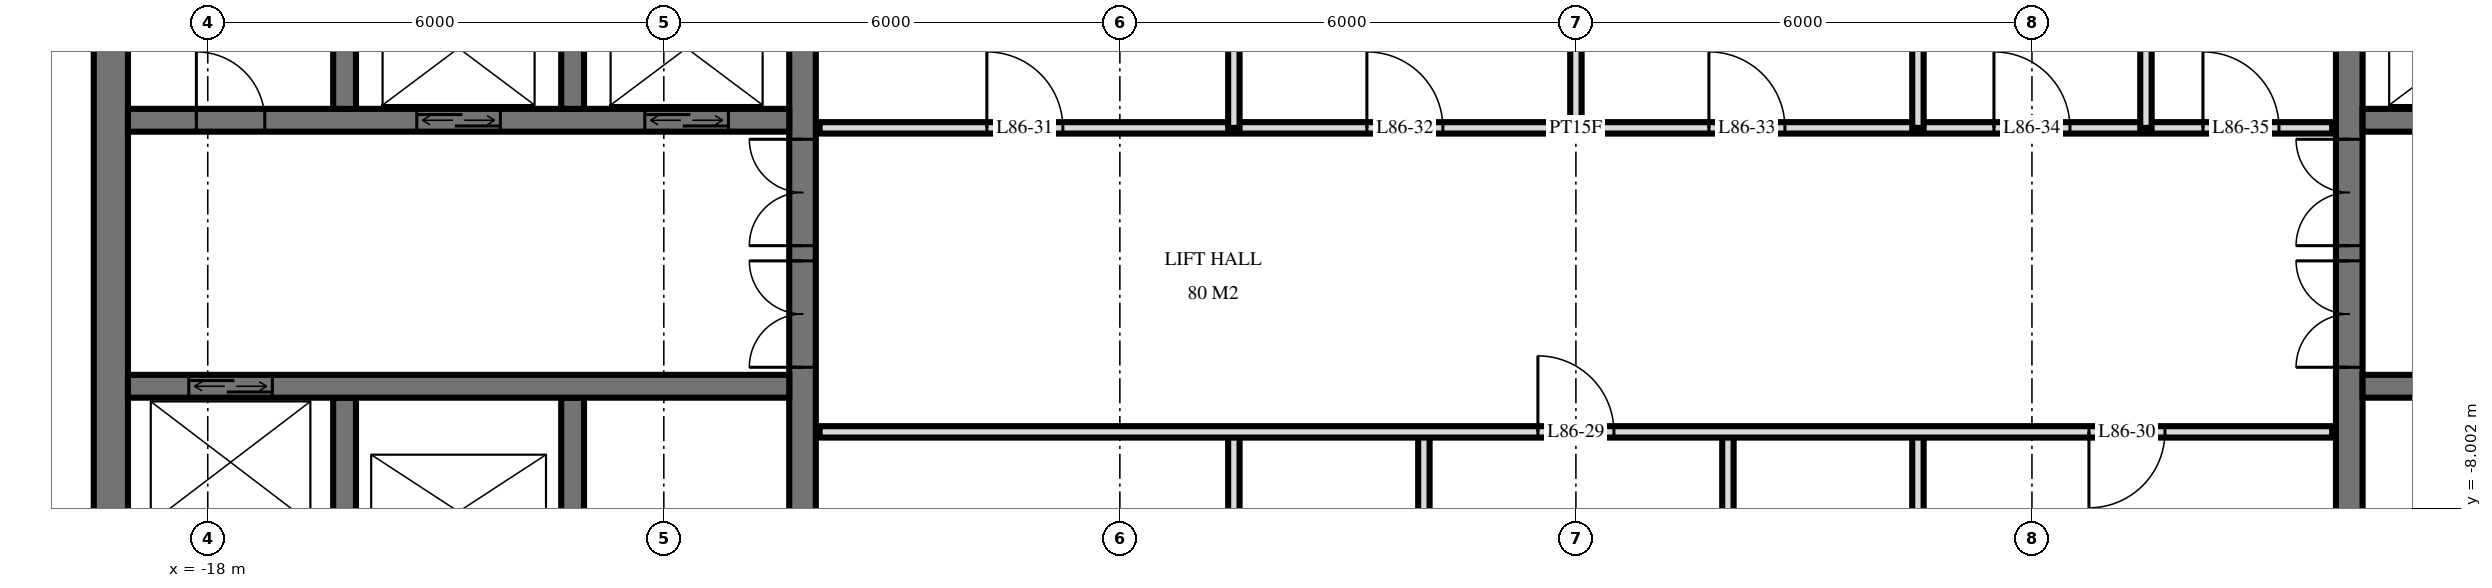
"""IFC4 building model, lengths in metres.
Left out: names, types, materials, properties, quantities, classifications, styles, units other than length and angle.
Written with IfcOpenShell. Run it as: python <this file> out.ifc"""

import sys

from ifc_helpers import new_model, si_unit, direction, frame, frame_2d, origin, place, context, subcontext, project, spatial, rectangle, extrude, element, fill, save


model = new_model("IFC4")
c1 = context("Model", 3, precision=1e-05, world=origin(), true_north=direction((0.0, 1.0)))
c2 = subcontext(c1, "Body", "Model", "MODEL_VIEW")
j1 = project(units=[si_unit("LENGTHUNIT", "METRE"), si_unit("PLANEANGLEUNIT", "RADIAN")], contexts=[c1])
p1 = place(None, origin())
s1 = spatial("IfcSite", under=j1, at=p1, CompositionType="ELEMENT")
p2 = place(p1, origin())
s2 = spatial("IfcBuilding", under=s1, at=p2, CompositionType="ELEMENT")
p3 = place(p2, frame((0.0, 0.0, 326.6)))
s3 = spatial("IfcBuildingStorey", under=s2, at=p3, CompositionType="ELEMENT", Elevation=326.6)
p4 = place(p3, frame((-10.175, -14.55, 0.0), z_axis=(0.0, 0.0, 1.0), x_axis=(0.0, 1.0, 0.0)))
e1 = element("IfcWall", 1, at=p4, inside=s3, PredefinedType="SHEAR", context=c2, shape_type="SweptSolid", body=[
    extrude(rectangle(XDim=14.1, YDim=0.35, at=frame_2d((7.05, 0.0))), origin(), (0.0, 0.0, 1.0), 4.0),
])
p5 = place(p4, frame((8.4, 0.0, 0.0)))
e2 = element("IfcOpeningElement", 2, at=p5, cuts=e1, PredefinedType="OPENING", context=c2, shape_type="SweptSolid", body=[
    extrude(rectangle(XDim=1.4, YDim=2.4, at=frame_2d((0.7, 1.2))), frame((0.0, 0.185, 0.0), z_axis=(0.0, -1.0, 0.0), x_axis=(1.0, 0.0, 0.0)), (0.0, 0.0, 1.0), 0.37),
])
p6 = place(p4, frame((10.0, 0.0, 0.0)))
e3 = element("IfcOpeningElement", 3, at=p6, cuts=e1, PredefinedType="OPENING", context=c2, shape_type="SweptSolid", body=[
    extrude(rectangle(XDim=1.4, YDim=2.4, at=frame_2d((0.7, 1.2))), frame((0.0, 0.185, 0.0), z_axis=(0.0, -1.0, 0.0), x_axis=(1.0, 0.0, 0.0)), (0.0, 0.0, 1.0), 0.37),
])
p7 = place(p4, frame((4.0, 0.0, 0.0)))
e4 = element("IfcOpeningElement", 4, at=p7, cuts=e1, PredefinedType="OPENING", context=c2, shape_type="SweptSolid", body=[
    extrude(rectangle(XDim=1.2, YDim=2.1, at=frame_2d((0.6, 1.05))), frame((0.0, 0.185, 0.0), z_axis=(0.0, -1.0, 0.0), x_axis=(1.0, 0.0, 0.0)), (0.0, 0.0, 1.0), 0.37),
])
p8 = place(p3, frame((-19.275, -14.55, 0.0), z_axis=(0.0, 0.0, 1.0), x_axis=(0.0, 1.0, 0.0)))
e5 = element("IfcWall", 5, at=p8, inside=s3, PredefinedType="SHEAR", context=c2, shape_type="SweptSolid", body=[
    extrude(rectangle(XDim=14.1, YDim=0.45, at=frame_2d((7.05, 0.0))), origin(), (0.0, 0.0, 1.0), 4.0),
])
p9 = place(p3, frame((-19.05, -2.9, 0.0), z_axis=(0.0, 0.0, 1.0), x_axis=(1.0, 0.0, 0.0)))
e6 = element("IfcWall", 6, at=p9, inside=s3, PredefinedType="SHEAR", context=c2, shape_type="SweptSolid", body=[
    extrude(rectangle(XDim=8.7, YDim=0.3, at=frame_2d((4.35, 0.0))), origin(), (0.0, 0.0, 1.0), 4.0),
])
p10 = place(p9, frame((6.8, 0.0, 0.0)))
e7 = element("IfcOpeningElement", 7, at=p10, cuts=e6, PredefinedType="OPENING", context=c2, shape_type="SweptSolid", body=[
    extrude(rectangle(XDim=1.1, YDim=2.1, at=frame_2d((0.55, 1.05))), frame((0.0, 0.16, 0.0), z_axis=(0.0, -1.0, 0.0), x_axis=(1.0, 0.0, 0.0)), (0.0, 0.0, 1.0), 0.32),
])
p11 = place(p9, frame((3.8, 0.0, 0.0)))
e8 = element("IfcOpeningElement", 8, at=p11, cuts=e6, PredefinedType="OPENING", context=c2, shape_type="SweptSolid", body=[
    extrude(rectangle(XDim=1.1, YDim=2.1, at=frame_2d((0.55, 1.05))), frame((0.0, 0.16, 0.0), z_axis=(0.0, -1.0, 0.0), x_axis=(1.0, 0.0, 0.0)), (0.0, 0.0, 1.0), 0.32),
])
p12 = place(p9, frame((0.9, 0.0, 0.0)))
e9 = element("IfcOpeningElement", 9, at=p12, cuts=e6, PredefinedType="OPENING", context=c2, shape_type="SweptSolid", body=[
    extrude(rectangle(XDim=0.9, YDim=2.1, at=frame_2d((0.45, 1.05))), frame((0.0, 0.16, 0.0), z_axis=(0.0, -1.0, 0.0), x_axis=(1.0, 0.0, 0.0)), (0.0, 0.0, 1.0), 0.32),
])
p13 = place(p3, frame((-19.05, -6.4, 0.0), z_axis=(0.0, 0.0, 1.0), x_axis=(1.0, 0.0, 0.0)))
e10 = element("IfcWall", 10, at=p13, inside=s3, PredefinedType="SHEAR", context=c2, shape_type="SweptSolid", body=[
    extrude(rectangle(XDim=8.7, YDim=0.3, at=frame_2d((4.35, 0.0))), origin(), (0.0, 0.0, 1.0), 4.0),
])
p14 = place(p13, frame((0.8, 0.0, 0.0)))
e11 = element("IfcOpeningElement", 11, at=p14, cuts=e10, PredefinedType="OPENING", context=c2, shape_type="SweptSolid", body=[
    extrude(rectangle(XDim=1.1, YDim=2.1, at=frame_2d((0.55, 1.05))), frame((0.0, 0.16, 0.0), z_axis=(0.0, -1.0, 0.0), x_axis=(1.0, 0.0, 0.0)), (0.0, 0.0, 1.0), 0.32),
])
for number, where, z_axis, x_axis in (
    (12, (-13.2, -2.75, 0.0), (0.0, 0.0, 1.0), (0.0, 1.0, 0.0)),
    (13, (-13.2, -8.85, 0.0), (0.0, 0.0, 1.0), (0.0, 1.0, 0.0)),
    (14, (-16.2, -2.75, 0.0), (0.0, 0.0, 1.0), (0.0, 1.0, 0.0)),
    (15, (-16.2, -8.85, 0.0), (0.0, 0.0, 1.0), (0.0, 1.0, 0.0)),
):
    element("IfcWall", number, at=place(p3, frame(where, z_axis=z_axis, x_axis=x_axis)), inside=s3, PredefinedType="SHEAR", context=c2, shape_type="SweptSolid", body=[
        extrude(rectangle(XDim=2.3, YDim=0.3, at=frame_2d((1.15, 0.0))), origin(), (0.0, 0.0, 1.0), 4.0),
    ])
p15 = place(p3, frame((10.175, -14.55, 0.0), z_axis=(0.0, 0.0, 1.0), x_axis=(0.0, 1.0, 0.0)))
e16 = element("IfcWall", 16, at=p15, inside=s3, PredefinedType="SHEAR", context=c2, shape_type="SweptSolid", body=[
    extrude(rectangle(XDim=14.1, YDim=0.35, at=frame_2d((7.05, 0.0))), origin(), (0.0, 0.0, 1.0), 4.0),
])
p16 = place(p15, frame((8.4, 0.0, 0.0)))
e17 = element("IfcOpeningElement", 17, at=p16, cuts=e16, PredefinedType="OPENING", context=c2, shape_type="SweptSolid", body=[
    extrude(rectangle(XDim=1.4, YDim=2.4, at=frame_2d((0.7, 1.2))), frame((0.0, 0.185, 0.0), z_axis=(0.0, -1.0, 0.0), x_axis=(1.0, 0.0, 0.0)), (0.0, 0.0, 1.0), 0.37),
])
p17 = place(p15, frame((10.0, 0.0, 0.0)))
e18 = element("IfcOpeningElement", 18, at=p17, cuts=e16, PredefinedType="OPENING", context=c2, shape_type="SweptSolid", body=[
    extrude(rectangle(XDim=1.4, YDim=2.4, at=frame_2d((0.7, 1.2))), frame((0.0, 0.185, 0.0), z_axis=(0.0, -1.0, 0.0), x_axis=(1.0, 0.0, 0.0)), (0.0, 0.0, 1.0), 0.37),
])
p18 = place(p15, frame((4.0, 0.0, 0.0)))
e19 = element("IfcOpeningElement", 19, at=p18, cuts=e16, PredefinedType="OPENING", context=c2, shape_type="SweptSolid", body=[
    extrude(rectangle(XDim=1.2, YDim=2.1, at=frame_2d((0.6, 1.05))), frame((0.0, 0.185, 0.0), z_axis=(0.0, -1.0, 0.0), x_axis=(1.0, 0.0, 0.0)), (0.0, 0.0, 1.0), 0.37),
])
p19 = place(p3, frame((10.35, -2.9, 0.0), z_axis=(0.0, 0.0, 1.0), x_axis=(1.0, 0.0, 0.0)))
e20 = element("IfcWall", 20, at=p19, inside=s3, PredefinedType="SHEAR", context=c2, shape_type="SweptSolid", body=[
    extrude(rectangle(XDim=8.7, YDim=0.3, at=frame_2d((4.35, 0.0))), origin(), (0.0, 0.0, 1.0), 4.0),
])
p20 = place(p19, frame((0.8, 0.0, 0.0)))
e21 = element("IfcOpeningElement", 21, at=p20, cuts=e20, PredefinedType="OPENING", context=c2, shape_type="SweptSolid", body=[
    extrude(rectangle(XDim=1.1, YDim=2.1, at=frame_2d((0.55, 1.05))), frame((0.0, 0.16, 0.0), z_axis=(0.0, -1.0, 0.0), x_axis=(1.0, 0.0, 0.0)), (0.0, 0.0, 1.0), 0.32),
])
p21 = place(p19, frame((3.8, 0.0, 0.0)))
e22 = element("IfcOpeningElement", 22, at=p21, cuts=e20, PredefinedType="OPENING", context=c2, shape_type="SweptSolid", body=[
    extrude(rectangle(XDim=1.1, YDim=2.1, at=frame_2d((0.55, 1.05))), frame((0.0, 0.16, 0.0), z_axis=(0.0, -1.0, 0.0), x_axis=(1.0, 0.0, 0.0)), (0.0, 0.0, 1.0), 0.32),
])
p22 = place(p19, frame((6.9, 0.0, 0.0)))
e23 = element("IfcOpeningElement", 23, at=p22, cuts=e20, PredefinedType="OPENING", context=c2, shape_type="SweptSolid", body=[
    extrude(rectangle(XDim=0.9, YDim=2.1, at=frame_2d((0.45, 1.05))), frame((0.0, 0.16, 0.0), z_axis=(0.0, -1.0, 0.0), x_axis=(1.0, 0.0, 0.0)), (0.0, 0.0, 1.0), 0.32),
])
p23 = place(p3, frame((10.35, -6.4, 0.0), z_axis=(0.0, 0.0, 1.0), x_axis=(1.0, 0.0, 0.0)))
e24 = element("IfcWall", 24, at=p23, inside=s3, PredefinedType="SHEAR", context=c2, shape_type="SweptSolid", body=[
    extrude(rectangle(XDim=8.7, YDim=0.3, at=frame_2d((4.35, 0.0))), origin(), (0.0, 0.0, 1.0), 4.0),
])
p24 = place(p23, frame((6.8, 0.0, 0.0)))
e25 = element("IfcOpeningElement", 25, at=p24, cuts=e24, PredefinedType="OPENING", context=c2, shape_type="SweptSolid", body=[
    extrude(rectangle(XDim=1.1, YDim=2.1, at=frame_2d((0.55, 1.05))), frame((0.0, 0.16, 0.0), z_axis=(0.0, -1.0, 0.0), x_axis=(1.0, 0.0, 0.0)), (0.0, 0.0, 1.0), 0.32),
])
p25 = place(p3, frame((7.5, -3.0, 0.0), z_axis=(0.0, 0.0, 1.0), x_axis=(0.0, 1.0, 0.0)))
e26 = element("IfcWall", 26, at=p25, inside=s3, PredefinedType="PLUMBINGWALL", context=c2, shape_type="SweptSolid", body=[
    extrude(rectangle(XDim=7.445, YDim=0.15, at=frame_2d((3.723, 0.0))), origin(), (0.0, 0.0, 1.0), 3.72),
])
p26 = place(p3, frame((4.5, -11.0, 0.0), z_axis=(0.0, 0.0, 1.0), x_axis=(0.0, 1.0, 0.0)))
e27 = element("IfcWall", 27, at=p26, inside=s3, PredefinedType="PARTITIONING", context=c2, shape_type="SweptSolid", body=[
    extrude(rectangle(XDim=4.0, YDim=0.15, at=frame_2d((2.0, 0.0))), origin(), (0.0, 0.0, 1.0), 3.72),
])
p27 = place(p3, frame((4.5, -3.0, 0.0), z_axis=(0.0, 0.0, 1.0), x_axis=(0.0, 1.0, 0.0)))
e28 = element("IfcWall", 28, at=p27, inside=s3, PredefinedType="PLUMBINGWALL", context=c2, shape_type="SweptSolid", body=[
    extrude(rectangle(XDim=7.077, YDim=0.15, at=frame_2d((3.539, 0.0))), origin(), (0.0, 0.0, 1.0), 3.72),
])
p28 = place(p3, frame((2.0, -11.0, 0.0), z_axis=(0.0, 0.0, 1.0), x_axis=(0.0, 1.0, 0.0)))
e29 = element("IfcWall", 29, at=p28, inside=s3, PredefinedType="PARTITIONING", context=c2, shape_type="SweptSolid", body=[
    extrude(rectangle(XDim=4.0, YDim=0.15, at=frame_2d((2.0, 0.0))), origin(), (0.0, 0.0, 1.0), 3.72),
])
p29 = place(p28, frame((1.5, 0.0, 0.0)))
e30 = element("IfcOpeningElement", 30, at=p29, cuts=e29, PredefinedType="OPENING", context=c2, shape_type="SweptSolid", body=[
    extrude(rectangle(XDim=1.0, YDim=2.1, at=frame_2d((0.5, 1.05))), frame((0.0, 0.085, 0.0), z_axis=(0.0, -1.0, 0.0), x_axis=(1.0, 0.0, 0.0)), (0.0, 0.0, 1.0), 0.17),
])
p30 = place(p3, frame((0.0, -3.0, 0.0), z_axis=(0.0, 0.0, 1.0), x_axis=(0.0, 1.0, 0.0)))
e31 = element("IfcWall", 31, at=p30, inside=s3, PredefinedType="PARTITIONING", context=c2, shape_type="SweptSolid", body=[
    extrude(rectangle(XDim=6.524, YDim=0.15, at=frame_2d((3.262, 0.0))), origin(), (0.0, 0.0, 1.0), 3.72),
])
p31 = place(p3, frame((-2.0, -11.0, 0.0), z_axis=(0.0, 0.0, 1.0), x_axis=(0.0, 1.0, 0.0)))
e32 = element("IfcWall", 32, at=p31, inside=s3, PredefinedType="PARTITIONING", context=c2, shape_type="SweptSolid", body=[
    extrude(rectangle(XDim=4.0, YDim=0.15, at=frame_2d((2.0, 0.0))), origin(), (0.0, 0.0, 1.0), 3.72),
])
p32 = place(p31, frame((1.5, 0.0, 0.0)))
e33 = element("IfcOpeningElement", 33, at=p32, cuts=e32, PredefinedType="OPENING", context=c2, shape_type="SweptSolid", body=[
    extrude(rectangle(XDim=1.0, YDim=2.1, at=frame_2d((0.5, 1.05))), frame((0.0, 0.085, 0.0), z_axis=(0.0, -1.0, 0.0), x_axis=(1.0, 0.0, 0.0)), (0.0, 0.0, 1.0), 0.17),
])
p33 = place(p3, frame((-4.5, -11.0, 0.0), z_axis=(0.0, 0.0, 1.0), x_axis=(0.0, 1.0, 0.0)))
e34 = element("IfcWall", 34, at=p33, inside=s3, PredefinedType="PARTITIONING", context=c2, shape_type="SweptSolid", body=[
    extrude(rectangle(XDim=4.0, YDim=0.15, at=frame_2d((2.0, 0.0))), origin(), (0.0, 0.0, 1.0), 3.72),
])
p34 = place(p3, frame((-4.5, -3.0, 0.0), z_axis=(0.0, 0.0, 1.0), x_axis=(0.0, 1.0, 0.0)))
e35 = element("IfcWall", 35, at=p34, inside=s3, PredefinedType="PARTITIONING", context=c2, shape_type="SweptSolid", body=[
    extrude(rectangle(XDim=5.972, YDim=0.15, at=frame_2d((2.986, 0.0))), origin(), (0.0, 0.0, 1.0), 3.72),
])
p35 = place(p3, frame((-9.95, -7.0, 0.0), z_axis=(0.0, 0.0, 1.0), x_axis=(1.0, 0.0, 0.0)))
e36 = element("IfcWall", 36, at=p35, inside=s3, PredefinedType="PARTITIONING", context=c2, shape_type="SweptSolid", body=[
    extrude(rectangle(XDim=19.9, YDim=0.15, at=frame_2d((9.95, 0.0))), origin(), (0.0, 0.0, 1.0), 3.72),
])
p36 = place(p35, frame((9.45, 0.0, 0.0)))
e37 = element("IfcOpeningElement", 37, at=p36, cuts=e36, PredefinedType="OPENING", context=c2, shape_type="SweptSolid", body=[
    extrude(rectangle(XDim=1.0, YDim=2.1, at=frame_2d((0.5, 1.05))), frame((0.0, 0.085, 0.0), z_axis=(0.0, -1.0, 0.0), x_axis=(1.0, 0.0, 0.0)), (0.0, 0.0, 1.0), 0.17),
])
p37 = place(p35, frame((16.7, 0.0, 0.0)))
e38 = element("IfcOpeningElement", 38, at=p37, cuts=e36, PredefinedType="OPENING", context=c2, shape_type="SweptSolid", body=[
    extrude(rectangle(XDim=1.0, YDim=2.1, at=frame_2d((0.5, 1.05))), frame((0.0, 0.085, 0.0), z_axis=(0.0, -1.0, 0.0), x_axis=(1.0, 0.0, 0.0)), (0.0, 0.0, 1.0), 0.17),
])
p38 = place(p3, frame((-9.95, -3.0, 0.0), z_axis=(0.0, 0.0, 1.0), x_axis=(1.0, 0.0, 0.0)))
e39 = element("IfcWall", 39, at=p38, inside=s3, PredefinedType="PARTITIONING", context=c2, shape_type="SweptSolid", body=[
    extrude(rectangle(XDim=19.9, YDim=0.15, at=frame_2d((9.95, 0.0))), origin(), (0.0, 0.0, 1.0), 3.72),
])
p39 = place(p38, frame((2.2, 0.0, 0.0)))
e40 = element("IfcOpeningElement", 40, at=p39, cuts=e39, PredefinedType="OPENING", context=c2, shape_type="SweptSolid", body=[
    extrude(rectangle(XDim=1.0, YDim=2.1, at=frame_2d((0.5, 1.05))), frame((0.0, 0.085, 0.0), z_axis=(0.0, -1.0, 0.0), x_axis=(1.0, 0.0, 0.0)), (0.0, 0.0, 1.0), 0.17),
])
p40 = place(p38, frame((7.2, 0.0, 0.0)))
e41 = element("IfcOpeningElement", 41, at=p40, cuts=e39, PredefinedType="OPENING", context=c2, shape_type="SweptSolid", body=[
    extrude(rectangle(XDim=1.0, YDim=2.1, at=frame_2d((0.5, 1.05))), frame((0.0, 0.085, 0.0), z_axis=(0.0, -1.0, 0.0), x_axis=(1.0, 0.0, 0.0)), (0.0, 0.0, 1.0), 0.17),
])
p41 = place(p38, frame((11.7, 0.0, 0.0)))
e42 = element("IfcOpeningElement", 42, at=p41, cuts=e39, PredefinedType="OPENING", context=c2, shape_type="SweptSolid", body=[
    extrude(rectangle(XDim=1.0, YDim=2.1, at=frame_2d((0.5, 1.05))), frame((0.0, 0.085, 0.0), z_axis=(0.0, -1.0, 0.0), x_axis=(1.0, 0.0, 0.0)), (0.0, 0.0, 1.0), 0.17),
])
p42 = place(p38, frame((15.45, 0.0, 0.0)))
e43 = element("IfcOpeningElement", 43, at=p42, cuts=e39, PredefinedType="OPENING", context=c2, shape_type="SweptSolid", body=[
    extrude(rectangle(XDim=1.0, YDim=2.1, at=frame_2d((0.5, 1.05))), frame((0.0, 0.085, 0.0), z_axis=(0.0, -1.0, 0.0), x_axis=(1.0, 0.0, 0.0)), (0.0, 0.0, 1.0), 0.17),
])
p43 = place(p38, frame((18.2, 0.0, 0.0)))
e44 = element("IfcOpeningElement", 44, at=p43, cuts=e39, PredefinedType="OPENING", context=c2, shape_type="SweptSolid", body=[
    extrude(rectangle(XDim=1.0, YDim=2.1, at=frame_2d((0.5, 1.05))), frame((0.0, 0.085, 0.0), z_axis=(0.0, -1.0, 0.0), x_axis=(1.0, 0.0, 0.0)), (0.0, 0.0, 1.0), 0.17),
])
p44 = place(p10, origin())
e45 = element("IfcDoor", 45, at=p44, inside=s3, OperationType="DOUBLE_DOOR_SLIDING", PredefinedType="USERDEFINED", context=c2, shape_type="SweptSolid", body=[
    extrude(rectangle(XDim=1.1, YDim=2.1, at=frame_2d((0.55, 1.05))), frame((0.0, 0.025, 0.0), z_axis=(0.0, -1.0, 0.0), x_axis=(1.0, 0.0, 0.0)), (0.0, 0.0, 1.0), 0.05),
])
fill(e7, e45)
p45 = place(p11, origin())
e46 = element("IfcDoor", 46, at=p45, inside=s3, OperationType="DOUBLE_DOOR_SLIDING", PredefinedType="USERDEFINED", context=c2, shape_type="SweptSolid", body=[
    extrude(rectangle(XDim=1.1, YDim=2.1, at=frame_2d((0.55, 1.05))), frame((0.0, 0.025, 0.0), z_axis=(0.0, -1.0, 0.0), x_axis=(1.0, 0.0, 0.0)), (0.0, 0.0, 1.0), 0.05),
])
fill(e8, e46)
p46 = place(p14, origin())
e47 = element("IfcDoor", 47, at=p46, inside=s3, OperationType="DOUBLE_DOOR_SLIDING", PredefinedType="USERDEFINED", context=c2, shape_type="SweptSolid", body=[
    extrude(rectangle(XDim=1.1, YDim=2.1, at=frame_2d((0.55, 1.05))), frame((0.0, 0.025, 0.0), z_axis=(0.0, -1.0, 0.0), x_axis=(1.0, 0.0, 0.0)), (0.0, 0.0, 1.0), 0.05),
])
fill(e11, e47)
p47 = place(p5, origin())
e48 = element("IfcDoor", 48, at=p47, inside=s3, OperationType="DOUBLE_DOOR_SINGLE_SWING", PredefinedType="DOOR", context=c2, shape_type="SweptSolid", body=[
    extrude(rectangle(XDim=1.4, YDim=2.4, at=frame_2d((0.7, 1.2))), frame((0.0, 0.025, 0.0), z_axis=(0.0, -1.0, 0.0), x_axis=(1.0, 0.0, 0.0)), (0.0, 0.0, 1.0), 0.05),
])
fill(e2, e48)
p48 = place(p6, origin())
e49 = element("IfcDoor", 49, at=p48, inside=s3, OperationType="DOUBLE_DOOR_SINGLE_SWING", PredefinedType="DOOR", context=c2, shape_type="SweptSolid", body=[
    extrude(rectangle(XDim=1.4, YDim=2.4, at=frame_2d((0.7, 1.2))), frame((0.0, 0.025, 0.0), z_axis=(0.0, -1.0, 0.0), x_axis=(1.0, 0.0, 0.0)), (0.0, 0.0, 1.0), 0.05),
])
fill(e3, e49)
p49 = place(p12, origin())
e50 = element("IfcDoor", 50, at=p49, inside=s3, OperationType="SINGLE_SWING_RIGHT", PredefinedType="DOOR", context=c2, shape_type="SweptSolid", body=[
    extrude(rectangle(XDim=0.9, YDim=2.1, at=frame_2d((0.45, 1.05))), frame((0.0, 0.025, 0.0), z_axis=(0.0, -1.0, 0.0), x_axis=(1.0, 0.0, 0.0)), (0.0, 0.0, 1.0), 0.05),
])
fill(e9, e50)
p50 = place(p16, origin())
e51 = element("IfcDoor", 51, at=p50, inside=s3, OperationType="DOUBLE_DOOR_SINGLE_SWING", PredefinedType="DOOR", context=c2, shape_type="SweptSolid", body=[
    extrude(rectangle(XDim=1.4, YDim=2.4, at=frame_2d((0.7, 1.2))), frame((0.0, 0.025, 0.0), z_axis=(0.0, -1.0, 0.0), x_axis=(1.0, 0.0, 0.0)), (0.0, 0.0, 1.0), 0.05),
])
fill(e17, e51)
p51 = place(p17, origin())
e52 = element("IfcDoor", 52, at=p51, inside=s3, OperationType="DOUBLE_DOOR_SINGLE_SWING", PredefinedType="DOOR", context=c2, shape_type="SweptSolid", body=[
    extrude(rectangle(XDim=1.4, YDim=2.4, at=frame_2d((0.7, 1.2))), frame((0.0, 0.025, 0.0), z_axis=(0.0, -1.0, 0.0), x_axis=(1.0, 0.0, 0.0)), (0.0, 0.0, 1.0), 0.05),
])
fill(e18, e52)
p52 = place(p36, origin())
e53 = element("IfcDoor", 53, at=p52, inside=s3, OperationType="SINGLE_SWING_RIGHT", PredefinedType="DOOR", context=c2, shape_type="SweptSolid", body=[
    extrude(rectangle(XDim=1.0, YDim=2.1, at=frame_2d((0.5, 1.05))), frame((0.0, 0.025, 0.0), z_axis=(0.0, -1.0, 0.0), x_axis=(1.0, 0.0, 0.0)), (0.0, 0.0, 1.0), 0.05),
])
fill(e37, e53)
p53 = place(p37, frame((0.5, 0.0, 0.0), z_axis=(0.0, 0.0, 1.0), x_axis=(-1.0, 0.0, 0.0)))
e54 = element("IfcDoor", 54, at=p53, inside=s3, OperationType="SINGLE_SWING_LEFT", PredefinedType="DOOR", context=c2, shape_type="SweptSolid", body=[
    extrude(rectangle(XDim=1.0, YDim=2.1, at=frame_2d((0.0, 1.05))), frame((0.0, -0.025, 0.0), z_axis=(0.0, 1.0, 0.0), x_axis=(-1.0, 0.0, 0.0)), (0.0, 0.0, 1.0), 0.05),
])
fill(e38, e54)
p54 = place(p39, origin())
e55 = element("IfcDoor", 55, at=p54, inside=s3, OperationType="SINGLE_SWING_RIGHT", PredefinedType="DOOR", context=c2, shape_type="SweptSolid", body=[
    extrude(rectangle(XDim=1.0, YDim=2.1, at=frame_2d((0.5, 1.05))), frame((0.0, 0.025, 0.0), z_axis=(0.0, -1.0, 0.0), x_axis=(1.0, 0.0, 0.0)), (0.0, 0.0, 1.0), 0.05),
])
fill(e40, e55)
p55 = place(p40, origin())
e56 = element("IfcDoor", 56, at=p55, inside=s3, OperationType="SINGLE_SWING_RIGHT", PredefinedType="DOOR", context=c2, shape_type="SweptSolid", body=[
    extrude(rectangle(XDim=1.0, YDim=2.1, at=frame_2d((0.5, 1.05))), frame((0.0, 0.025, 0.0), z_axis=(0.0, -1.0, 0.0), x_axis=(1.0, 0.0, 0.0)), (0.0, 0.0, 1.0), 0.05),
])
fill(e41, e56)
p56 = place(p41, origin())
e57 = element("IfcDoor", 57, at=p56, inside=s3, OperationType="SINGLE_SWING_RIGHT", PredefinedType="DOOR", context=c2, shape_type="SweptSolid", body=[
    extrude(rectangle(XDim=1.0, YDim=2.1, at=frame_2d((0.5, 1.05))), frame((0.0, 0.025, 0.0), z_axis=(0.0, -1.0, 0.0), x_axis=(1.0, 0.0, 0.0)), (0.0, 0.0, 1.0), 0.05),
])
fill(e42, e57)
p57 = place(p42, origin())
e58 = element("IfcDoor", 58, at=p57, inside=s3, OperationType="SINGLE_SWING_RIGHT", PredefinedType="DOOR", context=c2, shape_type="SweptSolid", body=[
    extrude(rectangle(XDim=1.0, YDim=2.1, at=frame_2d((0.5, 1.05))), frame((0.0, 0.025, 0.0), z_axis=(0.0, -1.0, 0.0), x_axis=(1.0, 0.0, 0.0)), (0.0, 0.0, 1.0), 0.05),
])
fill(e43, e58)
p58 = place(p43, origin())
e59 = element("IfcDoor", 59, at=p58, inside=s3, OperationType="SINGLE_SWING_RIGHT", PredefinedType="DOOR", context=c2, shape_type="SweptSolid", body=[
    extrude(rectangle(XDim=1.0, YDim=2.1, at=frame_2d((0.5, 1.05))), frame((0.0, 0.025, 0.0), z_axis=(0.0, -1.0, 0.0), x_axis=(1.0, 0.0, 0.0)), (0.0, 0.0, 1.0), 0.05),
])
fill(e44, e59)
save(model, sys.argv[1])
